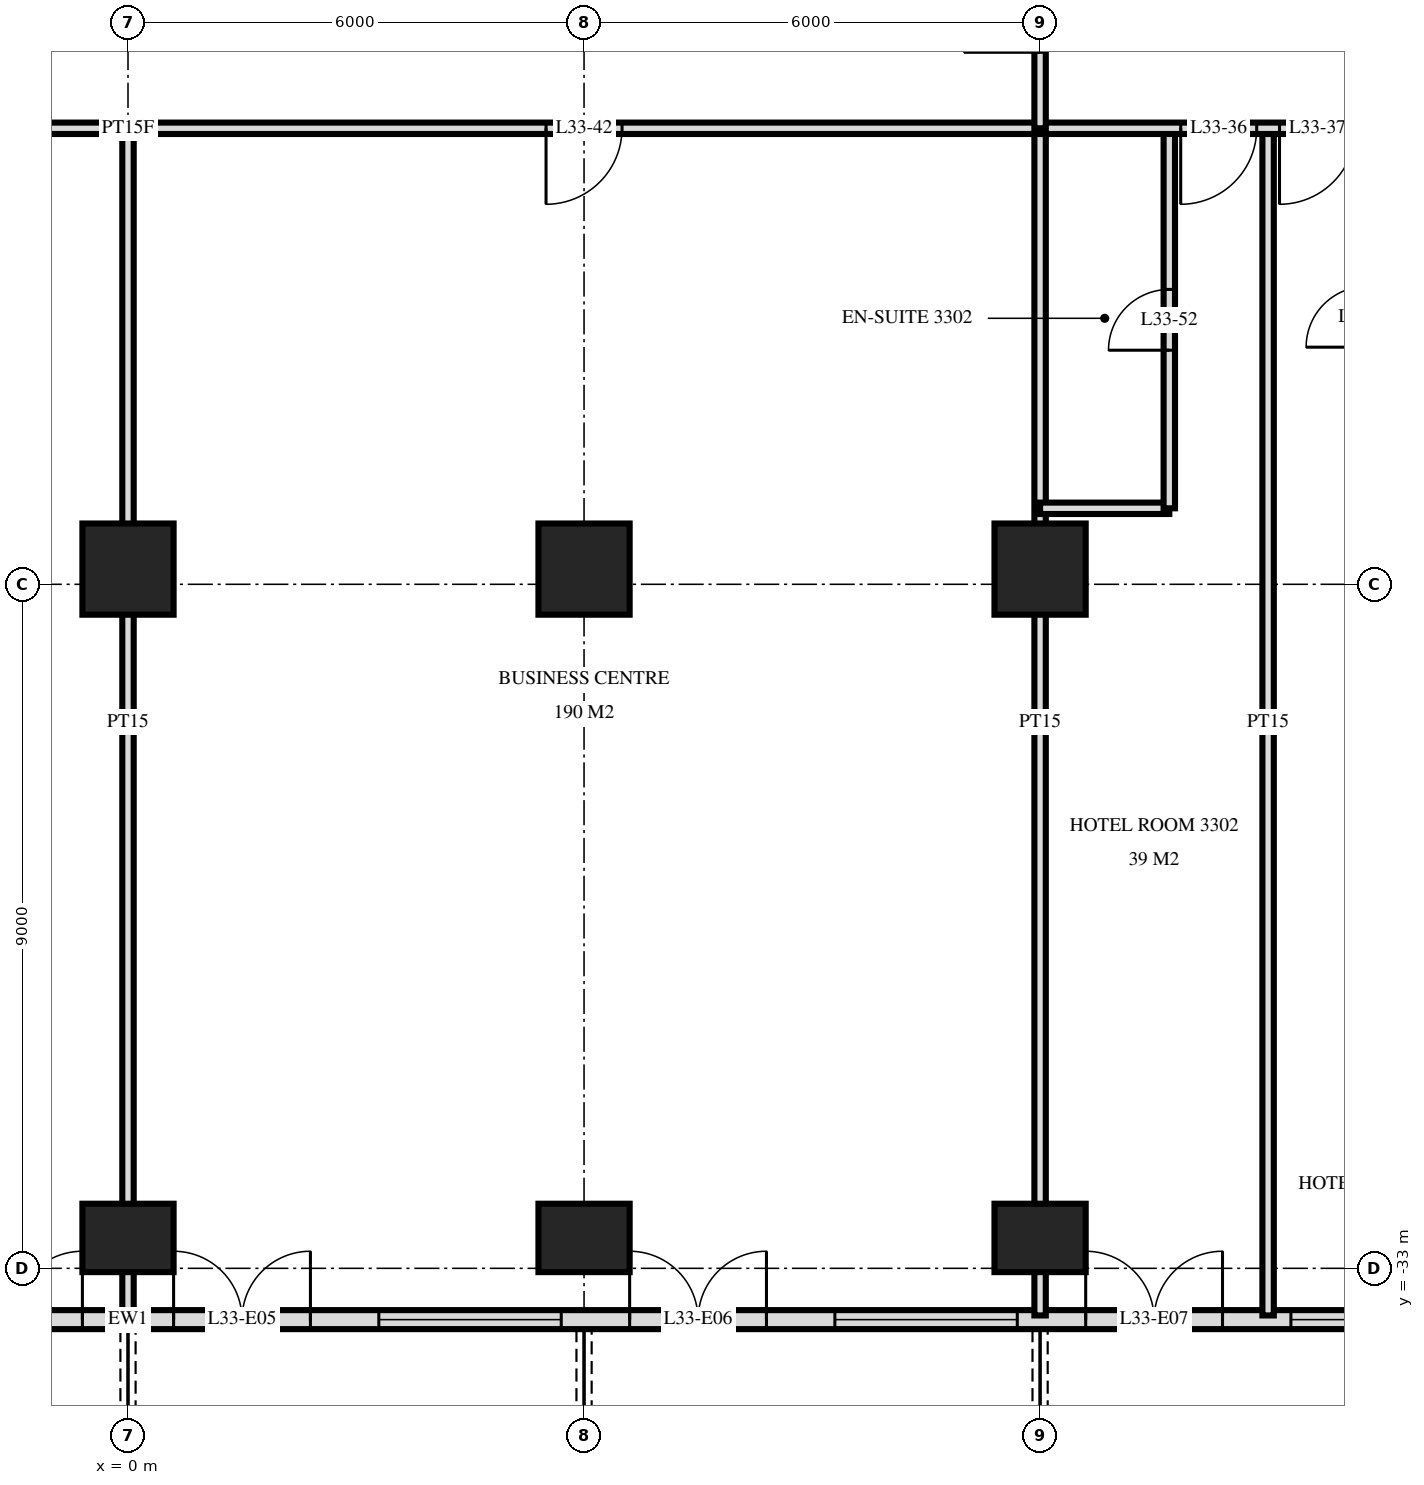
"""IFC4 building model, lengths in metres.
Left out: names, types, materials, properties, quantities, classifications, styles, units other than length and angle.
Written with IfcOpenShell. Run it as: python <this file> out.ifc"""

import sys

from ifc_helpers import new_model, si_unit, direction, frame, frame_2d, origin, origin_2d, place, context, subcontext, project, spatial, rectangle, extrude, element, fill, save


model = new_model("IFC4")
c1 = context("Model", 3, precision=1e-05, world=origin(), true_north=direction((0.0, 1.0)))
c2 = subcontext(c1, "Body", "Model", "MODEL_VIEW")
j1 = project(units=[si_unit("LENGTHUNIT", "METRE"), si_unit("PLANEANGLEUNIT", "RADIAN")], contexts=[c1])
p1 = place(None, origin())
s1 = spatial("IfcSite", under=j1, at=p1, CompositionType="ELEMENT")
p2 = place(p1, origin())
s2 = spatial("IfcBuilding", under=s1, at=p2, CompositionType="ELEMENT")
p3 = place(p2, frame((0.0, 0.0, 130.8)))
s3 = spatial("IfcBuildingStorey", under=s2, at=p3, CompositionType="ELEMENT", Elevation=130.8)
p4 = place(p3, frame((0.0, -32.6, 0.0), z_axis=(0.0, 0.0, 1.0), x_axis=(1.0, 0.0, 0.0)))
e1 = element("IfcColumn", 1, at=p4, inside=s3, PredefinedType="COLUMN", context=c2, shape_type="SweptSolid", body=[
    extrude(rectangle(XDim=1.2, YDim=0.9, at=origin_2d()), origin(), (0.0, 0.0, 1.0), 3.6),
])
p5 = place(p3, frame((0.0, -23.8, 0.0), z_axis=(0.0, 0.0, 1.0), x_axis=(1.0, 0.0, 0.0)))
e2 = element("IfcColumn", 2, at=p5, inside=s3, PredefinedType="COLUMN", context=c2, shape_type="SweptSolid", body=[
    extrude(rectangle(XDim=1.2, YDim=1.2, at=origin_2d()), origin(), (0.0, 0.0, 1.0), 3.6),
])
p6 = place(p3, frame((6.0, -32.6, 0.0), z_axis=(0.0, 0.0, 1.0), x_axis=(1.0, 0.0, 0.0)))
e3 = element("IfcColumn", 3, at=p6, inside=s3, PredefinedType="COLUMN", context=c2, shape_type="SweptSolid", body=[
    extrude(rectangle(XDim=1.2, YDim=0.9, at=origin_2d()), origin(), (0.0, 0.0, 1.0), 3.6),
])
p7 = place(p3, frame((6.0, -23.8, 0.0), z_axis=(0.0, 0.0, 1.0), x_axis=(1.0, 0.0, 0.0)))
e4 = element("IfcColumn", 4, at=p7, inside=s3, PredefinedType="COLUMN", context=c2, shape_type="SweptSolid", body=[
    extrude(rectangle(XDim=1.2, YDim=1.2, at=origin_2d()), origin(), (0.0, 0.0, 1.0), 3.6),
])
p8 = place(p3, frame((12.0, -32.6, 0.0), z_axis=(0.0, 0.0, 1.0), x_axis=(1.0, 0.0, 0.0)))
e5 = element("IfcColumn", 5, at=p8, inside=s3, PredefinedType="COLUMN", context=c2, shape_type="SweptSolid", body=[
    extrude(rectangle(XDim=1.2, YDim=0.9, at=origin_2d()), origin(), (0.0, 0.0, 1.0), 3.6),
])
p9 = place(p3, frame((12.0, -23.8, 0.0), z_axis=(0.0, 0.0, 1.0), x_axis=(1.0, 0.0, 0.0)))
e6 = element("IfcColumn", 6, at=p9, inside=s3, PredefinedType="COLUMN", context=c2, shape_type="SweptSolid", body=[
    extrude(rectangle(XDim=1.2, YDim=1.2, at=origin_2d()), origin(), (0.0, 0.0, 1.0), 3.6),
])
p10 = place(p3, frame((-23.675, -33.675, 0.0), z_axis=(0.0, 0.0, 1.0), x_axis=(1.0, 0.0, 0.0)))
e7 = element("IfcWall", 7, at=p10, inside=s3, PredefinedType="SOLIDWALL", context=c2, shape_type="SweptSolid", body=[
    extrude(rectangle(XDim=47.351, YDim=0.25, at=frame_2d((23.675, 0.0))), origin(), (0.0, 0.0, 1.0), 3.32),
])
p11 = place(p10, frame((3.425, 0.0, 0.0)))
e8 = element("IfcOpeningElement", 8, at=p11, cuts=e7, PredefinedType="OPENING", context=c2, shape_type="SweptSolid", body=[
    extrude(rectangle(XDim=1.8, YDim=2.4, at=frame_2d((0.9, 1.2))), frame((0.0, 0.135, 0.0), z_axis=(0.0, -1.0, 0.0), x_axis=(1.0, 0.0, 0.0)), (0.0, 0.0, 1.0), 0.27),
])
p12 = place(p10, frame((6.275, 0.0, 0.0)))
e9 = element("IfcOpeningElement", 9, at=p12, cuts=e7, PredefinedType="OPENING", context=c2, shape_type="SweptSolid", body=[
    extrude(rectangle(XDim=1.8, YDim=2.4, at=frame_2d((0.9, 1.2))), frame((0.0, 0.135, 0.0), z_axis=(0.0, -1.0, 0.0), x_axis=(1.0, 0.0, 0.0)), (0.0, 0.0, 1.0), 0.27),
])
p13 = place(p10, frame((8.975, 0.0, 0.3)))
e10 = element("IfcOpeningElement", 10, at=p13, cuts=e7, PredefinedType="OPENING", context=c2, shape_type="SweptSolid", body=[
    extrude(rectangle(XDim=2.4, YDim=2.1, at=frame_2d((1.2, 1.05))), frame((0.0, 0.135, 0.0), z_axis=(0.0, -1.0, 0.0), x_axis=(1.0, 0.0, 0.0)), (0.0, 0.0, 1.0), 0.27),
])
p14 = place(p10, frame((12.275, 0.0, 0.0)))
e11 = element("IfcOpeningElement", 11, at=p14, cuts=e7, PredefinedType="OPENING", context=c2, shape_type="SweptSolid", body=[
    extrude(rectangle(XDim=1.8, YDim=2.4, at=frame_2d((0.9, 1.2))), frame((0.0, 0.135, 0.0), z_axis=(0.0, -1.0, 0.0), x_axis=(1.0, 0.0, 0.0)), (0.0, 0.0, 1.0), 0.27),
])
p15 = place(p10, frame((14.975, 0.0, 0.3)))
e12 = element("IfcOpeningElement", 12, at=p15, cuts=e7, PredefinedType="OPENING", context=c2, shape_type="SweptSolid", body=[
    extrude(rectangle(XDim=2.4, YDim=2.1, at=frame_2d((1.2, 1.05))), frame((0.0, 0.135, 0.0), z_axis=(0.0, -1.0, 0.0), x_axis=(1.0, 0.0, 0.0)), (0.0, 0.0, 1.0), 0.27),
])
p16 = place(p10, frame((17.975, 0.0, 0.3)))
e13 = element("IfcOpeningElement", 13, at=p16, cuts=e7, PredefinedType="OPENING", context=c2, shape_type="SweptSolid", body=[
    extrude(rectangle(XDim=2.4, YDim=2.1, at=frame_2d((1.2, 1.05))), frame((0.0, 0.135, 0.0), z_axis=(0.0, -1.0, 0.0), x_axis=(1.0, 0.0, 0.0)), (0.0, 0.0, 1.0), 0.27),
])
p17 = place(p10, frame((21.275, 0.0, 0.0)))
e14 = element("IfcOpeningElement", 14, at=p17, cuts=e7, PredefinedType="OPENING", context=c2, shape_type="SweptSolid", body=[
    extrude(rectangle(XDim=1.8, YDim=2.4, at=frame_2d((0.9, 1.2))), frame((0.0, 0.135, 0.0), z_axis=(0.0, -1.0, 0.0), x_axis=(1.0, 0.0, 0.0)), (0.0, 0.0, 1.0), 0.27),
])
p18 = place(p10, frame((24.275, 0.0, 0.0)))
e15 = element("IfcOpeningElement", 15, at=p18, cuts=e7, PredefinedType="OPENING", context=c2, shape_type="SweptSolid", body=[
    extrude(rectangle(XDim=1.8, YDim=2.4, at=frame_2d((0.9, 1.2))), frame((0.0, 0.135, 0.0), z_axis=(0.0, -1.0, 0.0), x_axis=(1.0, 0.0, 0.0)), (0.0, 0.0, 1.0), 0.27),
])
p19 = place(p10, frame((26.975, 0.0, 0.3)))
e16 = element("IfcOpeningElement", 16, at=p19, cuts=e7, PredefinedType="OPENING", context=c2, shape_type="SweptSolid", body=[
    extrude(rectangle(XDim=2.4, YDim=2.1, at=frame_2d((1.2, 1.05))), frame((0.0, 0.135, 0.0), z_axis=(0.0, -1.0, 0.0), x_axis=(1.0, 0.0, 0.0)), (0.0, 0.0, 1.0), 0.27),
])
p20 = place(p10, frame((30.275, 0.0, 0.0)))
e17 = element("IfcOpeningElement", 17, at=p20, cuts=e7, PredefinedType="OPENING", context=c2, shape_type="SweptSolid", body=[
    extrude(rectangle(XDim=1.8, YDim=2.4, at=frame_2d((0.9, 1.2))), frame((0.0, 0.135, 0.0), z_axis=(0.0, -1.0, 0.0), x_axis=(1.0, 0.0, 0.0)), (0.0, 0.0, 1.0), 0.27),
])
p21 = place(p10, frame((32.975, 0.0, 0.3)))
e18 = element("IfcOpeningElement", 18, at=p21, cuts=e7, PredefinedType="OPENING", context=c2, shape_type="SweptSolid", body=[
    extrude(rectangle(XDim=2.4, YDim=2.1, at=frame_2d((1.2, 1.05))), frame((0.0, 0.135, 0.0), z_axis=(0.0, -1.0, 0.0), x_axis=(1.0, 0.0, 0.0)), (0.0, 0.0, 1.0), 0.27),
])
p22 = place(p10, frame((36.275, 0.0, 0.0)))
e19 = element("IfcOpeningElement", 19, at=p22, cuts=e7, PredefinedType="OPENING", context=c2, shape_type="SweptSolid", body=[
    extrude(rectangle(XDim=1.8, YDim=2.4, at=frame_2d((0.9, 1.2))), frame((0.0, 0.135, 0.0), z_axis=(0.0, -1.0, 0.0), x_axis=(1.0, 0.0, 0.0)), (0.0, 0.0, 1.0), 0.27),
])
p23 = place(p10, frame((38.975, 0.0, 0.3)))
e20 = element("IfcOpeningElement", 20, at=p23, cuts=e7, PredefinedType="OPENING", context=c2, shape_type="SweptSolid", body=[
    extrude(rectangle(XDim=2.4, YDim=2.1, at=frame_2d((1.2, 1.05))), frame((0.0, 0.135, 0.0), z_axis=(0.0, -1.0, 0.0), x_axis=(1.0, 0.0, 0.0)), (0.0, 0.0, 1.0), 0.27),
])
p24 = place(p10, frame((41.975, 0.0, 0.3)))
e21 = element("IfcOpeningElement", 21, at=p24, cuts=e7, PredefinedType="OPENING", context=c2, shape_type="SweptSolid", body=[
    extrude(rectangle(XDim=2.4, YDim=2.1, at=frame_2d((1.2, 1.05))), frame((0.0, 0.135, 0.0), z_axis=(0.0, -1.0, 0.0), x_axis=(1.0, 0.0, 0.0)), (0.0, 0.0, 1.0), 0.27),
])
p25 = place(p10, frame((45.125, 0.0, 0.0)))
e22 = element("IfcOpeningElement", 22, at=p25, cuts=e7, PredefinedType="OPENING", context=c2, shape_type="SweptSolid", body=[
    extrude(rectangle(XDim=1.8, YDim=2.4, at=frame_2d((0.9, 1.2))), frame((0.0, 0.135, 0.0), z_axis=(0.0, -1.0, 0.0), x_axis=(1.0, 0.0, 0.0)), (0.0, 0.0, 1.0), 0.27),
])
p26 = place(p3, frame((15.0, -33.62, 0.0), z_axis=(0.0, 0.0, 1.0), x_axis=(0.0, 1.0, 0.0)))
e23 = element("IfcWall", 23, at=p26, inside=s3, PredefinedType="PARTITIONING", context=c2, shape_type="SweptSolid", body=[
    extrude(rectangle(XDim=15.62, YDim=0.15, at=frame_2d((7.81, 0.0))), origin(), (0.0, 0.0, 1.0), 3.32),
])
p27 = place(p3, frame((13.7, -23.0, 0.0), z_axis=(0.0, 0.0, 1.0), x_axis=(0.0, 1.0, 0.0)))
e24 = element("IfcWall", 24, at=p27, inside=s3, PredefinedType="PARTITIONING", context=c2, shape_type="SweptSolid", body=[
    extrude(rectangle(XDim=5.0, YDim=0.15, at=frame_2d((2.5, 0.0))), origin(), (0.0, 0.0, 1.0), 3.32),
])
p28 = place(p27, frame((2.08, 0.0, 0.0)))
e25 = element("IfcOpeningElement", 25, at=p28, cuts=e24, PredefinedType="OPENING", context=c2, shape_type="SweptSolid", body=[
    extrude(rectangle(XDim=0.8, YDim=2.1, at=frame_2d((0.4, 1.05))), frame((0.0, 0.085, 0.0), z_axis=(0.0, -1.0, 0.0), x_axis=(1.0, 0.0, 0.0)), (0.0, 0.0, 1.0), 0.17),
])
p29 = place(p3, frame((12.0, -18.0, 0.0), z_axis=(0.0, 0.0, 1.0), x_axis=(0.0, 1.0, 0.0)))
e26 = element("IfcWall", 26, at=p29, inside=s3, PredefinedType="PARTITIONING", context=c2, shape_type="SweptSolid", body=[
    extrude(rectangle(XDim=2.95, YDim=0.15, at=frame_2d((1.475, 0.0))), origin(), (0.0, 0.0, 1.0), 3.32),
])
p30 = place(p29, frame((1.0, 0.0, 0.0)))
e27 = element("IfcOpeningElement", 27, at=p30, cuts=e26, PredefinedType="OPENING", context=c2, shape_type="SweptSolid", body=[
    extrude(rectangle(XDim=1.0, YDim=2.1, at=frame_2d((0.5, 1.05))), frame((0.0, 0.085, 0.0), z_axis=(0.0, -1.0, 0.0), x_axis=(1.0, 0.0, 0.0)), (0.0, 0.0, 1.0), 0.17),
])
for number, where, z_axis, x_axis in (
    (28, (12.0, -33.62, 0.0), (0.0, 0.0, 1.0), (0.0, 1.0, 0.0)),
    (29, (0.0, -33.62, 0.0), (0.0, 0.0, 1.0), (0.0, 1.0, 0.0)),
):
    element("IfcWall", number, at=place(p3, frame(where, z_axis=z_axis, x_axis=x_axis)), inside=s3, PredefinedType="PARTITIONING", context=c2, shape_type="SweptSolid", body=[
        extrude(rectangle(XDim=15.62, YDim=0.15, at=frame_2d((7.81, 0.0))), origin(), (0.0, 0.0, 1.0), 3.32),
    ])
p31 = place(p3, frame((12.0, -23.0, 0.0), z_axis=(0.0, 0.0, 1.0), x_axis=(1.0, 0.0, 0.0)))
e30 = element("IfcWall", 30, at=p31, inside=s3, PredefinedType="PARTITIONING", context=c2, shape_type="SweptSolid", body=[
    extrude(rectangle(XDim=1.7, YDim=0.15, at=frame_2d((0.85, 0.0))), origin(), (0.0, 0.0, 1.0), 3.32),
])
p32 = place(p3, frame((-28.02, -18.0, 0.0), z_axis=(0.0, 0.0, 1.0), x_axis=(1.0, 0.0, 0.0)))
e31 = element("IfcWall", 31, at=p32, inside=s3, PredefinedType="PARTITIONING", context=c2, shape_type="SweptSolid", body=[
    extrude(rectangle(XDim=56.04, YDim=0.15, at=frame_2d((28.02, 0.0))), origin(), (0.0, 0.0, 1.0), 3.32),
])
p33 = place(p32, frame((13.17, 0.0, 0.0)))
e32 = element("IfcOpeningElement", 32, at=p33, cuts=e31, PredefinedType="OPENING", context=c2, shape_type="SweptSolid", body=[
    extrude(rectangle(XDim=1.0, YDim=2.1, at=frame_2d((0.5, 1.05))), frame((0.0, 0.085, 0.0), z_axis=(0.0, -1.0, 0.0), x_axis=(1.0, 0.0, 0.0)), (0.0, 0.0, 1.0), 0.17),
])
p34 = place(p32, frame((11.32, 0.0, 0.0)))
e33 = element("IfcOpeningElement", 33, at=p34, cuts=e31, PredefinedType="OPENING", context=c2, shape_type="SweptSolid", body=[
    extrude(rectangle(XDim=1.0, YDim=2.1, at=frame_2d((0.5, 1.05))), frame((0.0, 0.085, 0.0), z_axis=(0.0, -1.0, 0.0), x_axis=(1.0, 0.0, 0.0)), (0.0, 0.0, 1.0), 0.17),
])
p35 = place(p32, frame((41.87, 0.0, 0.0)))
e34 = element("IfcOpeningElement", 34, at=p35, cuts=e31, PredefinedType="OPENING", context=c2, shape_type="SweptSolid", body=[
    extrude(rectangle(XDim=1.0, YDim=2.1, at=frame_2d((0.5, 1.05))), frame((0.0, 0.085, 0.0), z_axis=(0.0, -1.0, 0.0), x_axis=(1.0, 0.0, 0.0)), (0.0, 0.0, 1.0), 0.17),
])
p36 = place(p32, frame((43.17, 0.0, 0.0)))
e35 = element("IfcOpeningElement", 35, at=p36, cuts=e31, PredefinedType="OPENING", context=c2, shape_type="SweptSolid", body=[
    extrude(rectangle(XDim=1.0, YDim=2.1, at=frame_2d((0.5, 1.05))), frame((0.0, 0.085, 0.0), z_axis=(0.0, -1.0, 0.0), x_axis=(1.0, 0.0, 0.0)), (0.0, 0.0, 1.0), 0.17),
])
p37 = place(p32, frame((46.72, 0.0, 0.0)))
e36 = element("IfcOpeningElement", 36, at=p37, cuts=e31, PredefinedType="OPENING", context=c2, shape_type="SweptSolid", body=[
    extrude(rectangle(XDim=1.0, YDim=2.1, at=frame_2d((0.5, 1.05))), frame((0.0, 0.085, 0.0), z_axis=(0.0, -1.0, 0.0), x_axis=(1.0, 0.0, 0.0)), (0.0, 0.0, 1.0), 0.17),
])
p38 = place(p32, frame((21.52, 0.0, 0.0)))
e37 = element("IfcOpeningElement", 37, at=p38, cuts=e31, PredefinedType="OPENING", context=c2, shape_type="SweptSolid", body=[
    extrude(rectangle(XDim=1.0, YDim=2.1, at=frame_2d((0.5, 1.05))), frame((0.0, 0.085, 0.0), z_axis=(0.0, -1.0, 0.0), x_axis=(1.0, 0.0, 0.0)), (0.0, 0.0, 1.0), 0.17),
])
p39 = place(p32, frame((33.52, 0.0, 0.0)))
e38 = element("IfcOpeningElement", 38, at=p39, cuts=e31, PredefinedType="OPENING", context=c2, shape_type="SweptSolid", body=[
    extrude(rectangle(XDim=1.0, YDim=2.1, at=frame_2d((0.5, 1.05))), frame((0.0, 0.085, 0.0), z_axis=(0.0, -1.0, 0.0), x_axis=(1.0, 0.0, 0.0)), (0.0, 0.0, 1.0), 0.17),
])
p40 = place(p17, origin())
e39 = element("IfcDoor", 39, at=p40, inside=s3, OperationType="DOUBLE_DOOR_SINGLE_SWING", PredefinedType="DOOR", context=c2, shape_type="SweptSolid", body=[
    extrude(rectangle(XDim=1.8, YDim=2.4, at=frame_2d((0.9, 1.2))), frame((0.0, 0.025, 0.0), z_axis=(0.0, -1.0, 0.0), x_axis=(1.0, 0.0, 0.0)), (0.0, 0.0, 1.0), 0.05),
])
fill(e14, e39)
p41 = place(p18, origin())
e40 = element("IfcDoor", 40, at=p41, inside=s3, OperationType="DOUBLE_DOOR_SINGLE_SWING", PredefinedType="DOOR", context=c2, shape_type="SweptSolid", body=[
    extrude(rectangle(XDim=1.8, YDim=2.4, at=frame_2d((0.9, 1.2))), frame((0.0, 0.025, 0.0), z_axis=(0.0, -1.0, 0.0), x_axis=(1.0, 0.0, 0.0)), (0.0, 0.0, 1.0), 0.05),
])
fill(e15, e40)
p42 = place(p19, origin())
e41 = element("IfcWindow", 41, at=p42, inside=s3, PartitioningType="SINGLE_PANEL", PredefinedType="WINDOW", context=c2, shape_type="SweptSolid", body=[
    extrude(rectangle(XDim=2.4, YDim=2.1, at=frame_2d((1.2, 1.05))), frame((0.0, 0.03, 0.0), z_axis=(0.0, -1.0, 0.0), x_axis=(1.0, 0.0, 0.0)), (0.0, 0.0, 1.0), 0.06),
])
fill(e16, e41)
p43 = place(p20, origin())
e42 = element("IfcDoor", 42, at=p43, inside=s3, OperationType="DOUBLE_DOOR_SINGLE_SWING", PredefinedType="DOOR", context=c2, shape_type="SweptSolid", body=[
    extrude(rectangle(XDim=1.8, YDim=2.4, at=frame_2d((0.9, 1.2))), frame((0.0, 0.025, 0.0), z_axis=(0.0, -1.0, 0.0), x_axis=(1.0, 0.0, 0.0)), (0.0, 0.0, 1.0), 0.05),
])
fill(e17, e42)
p44 = place(p21, origin())
e43 = element("IfcWindow", 43, at=p44, inside=s3, PartitioningType="SINGLE_PANEL", PredefinedType="WINDOW", context=c2, shape_type="SweptSolid", body=[
    extrude(rectangle(XDim=2.4, YDim=2.1, at=frame_2d((1.2, 1.05))), frame((0.0, 0.03, 0.0), z_axis=(0.0, -1.0, 0.0), x_axis=(1.0, 0.0, 0.0)), (0.0, 0.0, 1.0), 0.06),
])
fill(e18, e43)
p45 = place(p22, origin())
e44 = element("IfcDoor", 44, at=p45, inside=s3, OperationType="DOUBLE_DOOR_SINGLE_SWING", PredefinedType="DOOR", context=c2, shape_type="SweptSolid", body=[
    extrude(rectangle(XDim=1.8, YDim=2.4, at=frame_2d((0.9, 1.2))), frame((0.0, 0.025, 0.0), z_axis=(0.0, -1.0, 0.0), x_axis=(1.0, 0.0, 0.0)), (0.0, 0.0, 1.0), 0.05),
])
fill(e19, e44)
p46 = place(p23, origin())
e45 = element("IfcWindow", 45, at=p46, inside=s3, PartitioningType="SINGLE_PANEL", PredefinedType="WINDOW", context=c2, shape_type="SweptSolid", body=[
    extrude(rectangle(XDim=2.4, YDim=2.1, at=frame_2d((1.2, 1.05))), frame((0.0, 0.03, 0.0), z_axis=(0.0, -1.0, 0.0), x_axis=(1.0, 0.0, 0.0)), (0.0, 0.0, 1.0), 0.06),
])
fill(e20, e45)
p47 = place(p35, frame((0.5, 0.0, 0.0), z_axis=(0.0, 0.0, 1.0), x_axis=(-1.0, 0.0, 0.0)))
e46 = element("IfcDoor", 46, at=p47, inside=s3, OperationType="SINGLE_SWING_LEFT", PredefinedType="DOOR", context=c2, shape_type="SweptSolid", body=[
    extrude(rectangle(XDim=1.0, YDim=2.1, at=frame_2d((0.0, 1.05))), frame((0.0, -0.025, 0.0), z_axis=(0.0, 1.0, 0.0), x_axis=(-1.0, 0.0, 0.0)), (0.0, 0.0, 1.0), 0.05),
])
fill(e34, e46)
p48 = place(p36, frame((0.5, 0.0, 0.0), z_axis=(0.0, 0.0, 1.0), x_axis=(-1.0, 0.0, 0.0)))
e47 = element("IfcDoor", 47, at=p48, inside=s3, OperationType="SINGLE_SWING_LEFT", PredefinedType="DOOR", context=c2, shape_type="SweptSolid", body=[
    extrude(rectangle(XDim=1.0, YDim=2.1, at=frame_2d((0.0, 1.05))), frame((0.0, -0.025, 0.0), z_axis=(0.0, 1.0, 0.0), x_axis=(-1.0, 0.0, 0.0)), (0.0, 0.0, 1.0), 0.05),
])
fill(e35, e47)
p49 = place(p39, frame((0.5, 0.0, 0.0), z_axis=(0.0, 0.0, 1.0), x_axis=(-1.0, 0.0, 0.0)))
e48 = element("IfcDoor", 48, at=p49, inside=s3, OperationType="SINGLE_SWING_LEFT", PredefinedType="DOOR", context=c2, shape_type="SweptSolid", body=[
    extrude(rectangle(XDim=1.0, YDim=2.1, at=frame_2d((0.0, 1.05))), frame((0.0, -0.025, 0.0), z_axis=(0.0, 1.0, 0.0), x_axis=(-1.0, 0.0, 0.0)), (0.0, 0.0, 1.0), 0.05),
])
fill(e38, e48)
p50 = place(p28, origin())
e49 = element("IfcDoor", 49, at=p50, inside=s3, OperationType="SINGLE_SWING_RIGHT", PredefinedType="DOOR", context=c2, shape_type="SweptSolid", body=[
    extrude(rectangle(XDim=0.8, YDim=2.1, at=frame_2d((0.4, 1.05))), frame((0.0, 0.025, 0.0), z_axis=(0.0, -1.0, 0.0), x_axis=(1.0, 0.0, 0.0)), (0.0, 0.0, 1.0), 0.05),
])
fill(e25, e49)
save(model, sys.argv[1])
